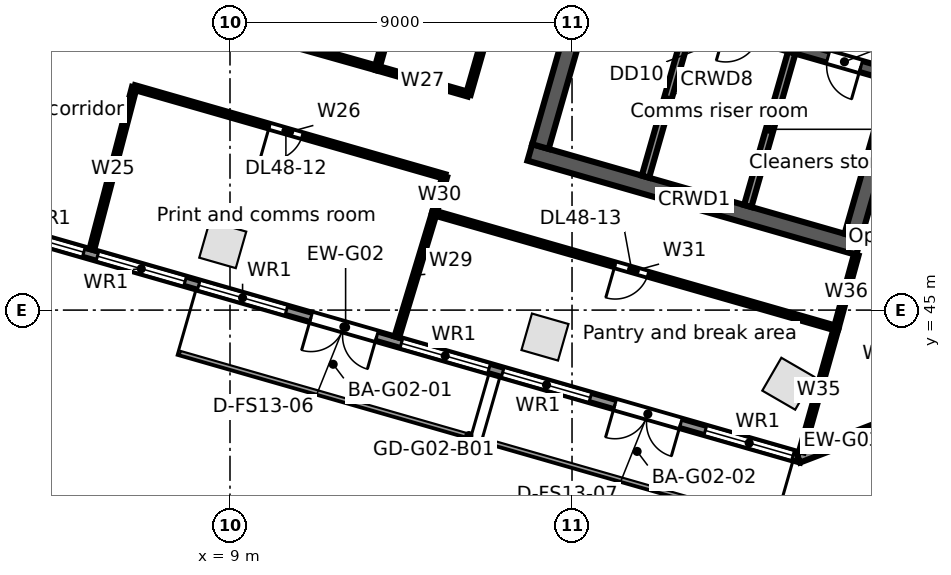
"""IFC4 building model, lengths in metres.
Left out: names, types, materials, properties, quantities, classifications, styles, units other than length and angle.
Written with IfcOpenShell. Run it as: python <this file> out.ifc"""

import sys

from ifc_helpers import new_model, si_unit, direction, frame, frame_2d, origin, origin_2d, place, context, subcontext, project, spatial, rectangle, extrude, element, fill, save


model = new_model("IFC4")
c1 = context("Model", 3, precision=1e-05, world=origin(), true_north=direction((0.0, 1.0)))
c2 = subcontext(c1, "Body", "Model", "MODEL_VIEW")
j1 = project(units=[si_unit("LENGTHUNIT", "METRE"), si_unit("PLANEANGLEUNIT", "RADIAN")], contexts=[c1])
p1 = place(None, origin())
s1 = spatial("IfcSite", under=j1, at=p1, CompositionType="ELEMENT")
p2 = place(p1, origin())
s2 = spatial("IfcBuilding", under=s1, at=p2, CompositionType="ELEMENT")
p3 = place(p2, frame((0.0, 0.0, 223.1)))
s3 = spatial("IfcBuildingStorey", under=s2, at=p3, CompositionType="ELEMENT", Elevation=223.1)
for number, where, z_axis, x_axis in (
    (1, (8.81, 46.722, 0.0), (0.0, 0.0, 1.0), (0.961, -0.276, 0.0)),
    (2, (17.288, 44.291, 0.0), (0.0, 0.0, 1.0), (0.961, -0.276, 0.0)),
    (3, (23.69, 43.063, 0.0), (0.0, 0.0, 1.0), (-0.865, 0.501, 0.0)),
):
    element("IfcColumn", number, at=place(p3, frame(where, z_axis=z_axis, x_axis=x_axis)), inside=s3, PredefinedType="COLUMN", context=c2, shape_type="SweptSolid", body=[
        extrude(rectangle(XDim=1.0, YDim=1.0, at=origin_2d()), origin(), (0.0, 0.0, 1.0), 3.9),
    ])
p4 = place(p3, frame((24.034, 41.108, 0.0), z_axis=(0.0, 0.0, 1.0), x_axis=(-0.96126060691, 0.275641153683, 0.0)))
e4 = element("IfcWall", 4, at=p4, inside=s3, PredefinedType="STANDARD", context=c2, shape_type="SweptSolid", body=[
    extrude(rectangle(XDim=24.951, YDim=0.25, at=frame_2d((12.475, 0.0))), origin(), (0.0, 0.0, 1.0), 3.62),
])
p5 = place(p4, frame((22.416, 0.0, 0.8)))
e5 = element("IfcOpeningElement", 5, at=p5, cuts=e4, PredefinedType="OPENING", context=c2, shape_type="SweptSolid", body=[
    extrude(rectangle(XDim=2.4, YDim=2.2, at=frame_2d((1.2, 1.1))), frame((0.0, 0.135, 0.0), z_axis=(0.0, -1.0, 0.0), x_axis=(1.0, 0.0, 0.0)), (0.0, 0.0, 1.0), 0.27),
])
p6 = place(p4, frame((19.643, 0.0, 0.8)))
e6 = element("IfcOpeningElement", 6, at=p6, cuts=e4, PredefinedType="OPENING", context=c2, shape_type="SweptSolid", body=[
    extrude(rectangle(XDim=2.4, YDim=2.2, at=frame_2d((1.2, 1.1))), frame((0.0, 0.135, 0.0), z_axis=(0.0, -1.0, 0.0), x_axis=(1.0, 0.0, 0.0)), (0.0, 0.0, 1.0), 0.27),
])
p7 = place(p4, frame((16.869, 0.0, 0.8)))
e7 = element("IfcOpeningElement", 7, at=p7, cuts=e4, PredefinedType="OPENING", context=c2, shape_type="SweptSolid", body=[
    extrude(rectangle(XDim=2.4, YDim=2.2, at=frame_2d((1.2, 1.1))), frame((0.0, 0.135, 0.0), z_axis=(0.0, -1.0, 0.0), x_axis=(1.0, 0.0, 0.0)), (0.0, 0.0, 1.0), 0.27),
])
p8 = place(p4, frame((14.096, 0.0, 0.8)))
e8 = element("IfcOpeningElement", 8, at=p8, cuts=e4, PredefinedType="OPENING", context=c2, shape_type="SweptSolid", body=[
    extrude(rectangle(XDim=2.4, YDim=2.2, at=frame_2d((1.2, 1.1))), frame((0.0, 0.135, 0.0), z_axis=(0.0, -1.0, 0.0), x_axis=(1.0, 0.0, 0.0)), (0.0, 0.0, 1.0), 0.27),
])
p9 = place(p4, frame((11.622, 0.0, 0.0)))
e9 = element("IfcOpeningElement", 9, at=p9, cuts=e4, PredefinedType="OPENING", context=c2, shape_type="SweptSolid", body=[
    extrude(rectangle(XDim=1.8, YDim=2.4, at=frame_2d((0.9, 1.2))), frame((0.0, 0.135, 0.0), z_axis=(0.0, -1.0, 0.0), x_axis=(1.0, 0.0, 0.0)), (0.0, 0.0, 1.0), 0.27),
])
p10 = place(p4, frame((8.549, 0.0, 0.8)))
e10 = element("IfcOpeningElement", 10, at=p10, cuts=e4, PredefinedType="OPENING", context=c2, shape_type="SweptSolid", body=[
    extrude(rectangle(XDim=2.4, YDim=2.2, at=frame_2d((1.2, 1.1))), frame((0.0, 0.135, 0.0), z_axis=(0.0, -1.0, 0.0), x_axis=(1.0, 0.0, 0.0)), (0.0, 0.0, 1.0), 0.27),
])
p11 = place(p4, frame((5.775, 0.0, 0.8)))
e11 = element("IfcOpeningElement", 11, at=p11, cuts=e4, PredefinedType="OPENING", context=c2, shape_type="SweptSolid", body=[
    extrude(rectangle(XDim=2.4, YDim=2.2, at=frame_2d((1.2, 1.1))), frame((0.0, 0.135, 0.0), z_axis=(0.0, -1.0, 0.0), x_axis=(1.0, 0.0, 0.0)), (0.0, 0.0, 1.0), 0.27),
])
p12 = place(p4, frame((3.302, 0.0, 0.0)))
e12 = element("IfcOpeningElement", 12, at=p12, cuts=e4, PredefinedType="OPENING", context=c2, shape_type="SweptSolid", body=[
    extrude(rectangle(XDim=1.8, YDim=2.4, at=frame_2d((0.9, 1.2))), frame((0.0, 0.135, 0.0), z_axis=(0.0, -1.0, 0.0), x_axis=(1.0, 0.0, 0.0)), (0.0, 0.0, 1.0), 0.27),
])
p13 = place(p4, frame((0.229, 0.0, 0.8)))
e13 = element("IfcOpeningElement", 13, at=p13, cuts=e4, PredefinedType="OPENING", context=c2, shape_type="SweptSolid", body=[
    extrude(rectangle(XDim=2.4, YDim=2.2, at=frame_2d((1.2, 1.1))), frame((0.0, 0.135, 0.0), z_axis=(0.0, -1.0, 0.0), x_axis=(1.0, 0.0, 0.0)), (0.0, 0.0, 1.0), 0.27),
])
p14 = place(p3, frame((26.27, 41.993, 0.0), z_axis=(0.0, 0.0, 1.0), x_axis=(-0.933573798066, -0.358385216722, 0.0)))
e14 = element("IfcWall", 14, at=p14, inside=s3, PredefinedType="STANDARD", context=c2, shape_type="SweptSolid", body=[
    extrude(rectangle(XDim=2.48, YDim=0.25, at=frame_2d((1.24, 0.0))), origin(), (0.0, 0.0, 1.0), 3.62),
])
p15 = place(p3, frame((16.89, 49.149, 0.0), z_axis=(0.0, 0.0, 1.0), x_axis=(0.96126248289, -0.275634611374, 0.0)))
e15 = element("IfcWall", 15, at=p15, inside=s3, PredefinedType="SOLIDWALL", context=c2, shape_type="SweptSolid", body=[
    extrude(rectangle(XDim=9.0, YDim=0.45, at=frame_2d((4.5, 0.0))), origin(), (0.0, 0.0, 1.0), 3.62),
])
p16 = place(p3, frame((21.131, 52.692, 0.0), z_axis=(0.0, 0.0, 1.0), x_axis=(0.961261488075, -0.275638080722, 0.0)))
e16 = element("IfcWall", 16, at=p16, inside=s3, PredefinedType="SOLIDWALL", context=c2, shape_type="SweptSolid", body=[
    extrude(rectangle(XDim=5.45, YDim=0.3, at=frame_2d((2.725, 0.0))), origin(), (0.0, 0.0, 1.0), 3.62),
])
p17 = place(p16, frame((0.95, 0.0, 0.0)))
e17 = element("IfcOpeningElement", 17, at=p17, cuts=e16, PredefinedType="OPENING", context=c2, shape_type="SweptSolid", body=[
    extrude(rectangle(XDim=0.9, YDim=2.1, at=frame_2d((0.45, 1.05))), frame((0.0, 0.16, 0.0), z_axis=(0.0, -1.0, 0.0), x_axis=(1.0, 0.0, 0.0)), (0.0, 0.0, 1.0), 0.32),
])
p18 = place(p16, frame((3.75, 0.0, 0.0)))
e18 = element("IfcOpeningElement", 18, at=p18, cuts=e16, PredefinedType="OPENING", context=c2, shape_type="SweptSolid", body=[
    extrude(rectangle(XDim=0.9, YDim=2.1, at=frame_2d((0.45, 1.05))), frame((0.0, 0.16, 0.0), z_axis=(0.0, -1.0, 0.0), x_axis=(1.0, 0.0, 0.0)), (0.0, 0.0, 1.0), 0.32),
])
p19 = place(p3, frame((17.168, 49.303, 0.0), z_axis=(0.0, 0.0, 1.0), x_axis=(0.275638974822, 0.961261231695, 0.0)))
e19 = element("IfcWall", 19, at=p19, inside=s3, PredefinedType="SOLIDWALL", context=c2, shape_type="SweptSolid", body=[
    extrude(rectangle(XDim=11.1, YDim=0.45, at=frame_2d((5.55, 0.0))), origin(), (0.0, 0.0, 1.0), 3.62),
])
p20 = place(p19, frame((4.95, 0.0, 0.0)))
e20 = element("IfcOpeningElement", 20, at=p20, cuts=e19, PredefinedType="OPENING", context=c2, shape_type="SweptSolid", body=[
    extrude(rectangle(XDim=1.2, YDim=2.1, at=frame_2d((0.6, 1.05))), frame((0.0, 0.235, 0.0), z_axis=(0.0, -1.0, 0.0), x_axis=(1.0, 0.0, 0.0)), (0.0, 0.0, 1.0), 0.47),
])
p21 = place(p3, frame((19.932, 48.511, 0.0), z_axis=(0.0, 0.0, 1.0), x_axis=(0.275642273411, 0.961260285827, 0.0)))
e21 = element("IfcWall", 21, at=p21, inside=s3, PredefinedType="SOLIDWALL", context=c2, shape_type="SweptSolid", body=[
    extrude(rectangle(XDim=4.2, YDim=0.2, at=frame_2d((2.1, 0.0))), origin(), (0.0, 0.0, 1.0), 3.62),
])
p22 = place(p3, frame((22.623, 47.739, 0.0), z_axis=(0.0, 0.0, 1.0), x_axis=(0.275642273411, 0.961260285827, 0.0)))
e22 = element("IfcWall", 22, at=p22, inside=s3, PredefinedType="PARTITIONING", context=c2, shape_type="SweptSolid", body=[
    extrude(rectangle(XDim=4.2, YDim=0.2, at=frame_2d((2.1, 0.0))), origin(), (0.0, 0.0, 1.0), 3.62),
])
p23 = place(p3, frame((25.387, 46.947, 0.0), z_axis=(0.0, 0.0, 1.0), x_axis=(0.275638974822, 0.961261231695, 0.0)))
e23 = element("IfcWall", 23, at=p23, inside=s3, PredefinedType="SOLIDWALL", context=c2, shape_type="SweptSolid", body=[
    extrude(rectangle(XDim=11.1, YDim=0.45, at=frame_2d((5.55, 0.0))), origin(), (0.0, 0.0, 1.0), 3.62),
])
p24 = place(p23, frame((4.95, 0.0, 0.0)))
e24 = element("IfcOpeningElement", 24, at=p24, cuts=e23, PredefinedType="OPENING", context=c2, shape_type="SweptSolid", body=[
    extrude(rectangle(XDim=1.2, YDim=2.1, at=frame_2d((0.6, 1.05))), frame((0.0, 0.235, 0.0), z_axis=(0.0, -1.0, 0.0), x_axis=(1.0, 0.0, 0.0)), (0.0, 0.0, 1.0), 0.47),
])
p25 = place(p3, frame((0.0, 55.0, 0.0), z_axis=(0.0, 0.0, 1.0), x_axis=(0.962402937884, -0.271625818271, 0.0)))
e25 = element("IfcWall", 25, at=p25, inside=s3, PredefinedType="PARTITIONING", context=c2, shape_type="SweptSolid", body=[
    extrude(rectangle(XDim=13.372, YDim=0.125, at=frame_2d((6.686, 0.0))), origin(), (0.0, 0.0, 1.0), 2.8),
])
p26 = place(p25, frame((5.7, 0.0, 0.0)))
e26 = element("IfcOpeningElement", 26, at=p26, cuts=e25, PredefinedType="OPENING", context=c2, shape_type="SweptSolid", body=[
    extrude(rectangle(XDim=1.8, YDim=2.1, at=frame_2d((0.9, 1.05))), frame((0.0, 0.073, 0.0), z_axis=(0.0, -1.0, 0.0), x_axis=(1.0, 0.0, 0.0)), (0.0, 0.0, 1.0), 0.145),
])
p27 = place(p3, frame((5.364, 46.592, 0.0), z_axis=(0.0, 0.0, 1.0), x_axis=(0.253446952203, 0.967349286669, 0.0)))
e27 = element("IfcWall", 27, at=p27, inside=s3, PredefinedType="PARTITIONING", context=c2, shape_type="SweptSolid", body=[
    extrude(rectangle(XDim=4.411, YDim=0.125, at=frame_2d((2.206, 0.0))), origin(), (0.0, 0.0, 1.0), 2.988),
])
p28 = place(p3, frame((6.482, 50.859, 0.0), z_axis=(0.0, 0.0, 1.0), x_axis=(0.961261196169, -0.275639098713, 0.0)))
e28 = element("IfcWall", 28, at=p28, inside=s3, PredefinedType="PARTITIONING", context=c2, shape_type="SweptSolid", body=[
    extrude(rectangle(XDim=8.5, YDim=0.125, at=frame_2d((4.25, 0.0))), origin(), (0.0, 0.0, 1.0), 2.8),
])
p29 = place(p28, frame((3.7, 0.0, 0.0)))
e29 = element("IfcOpeningElement", 29, at=p29, cuts=e28, PredefinedType="OPENING", context=c2, shape_type="SweptSolid", body=[
    extrude(rectangle(XDim=0.9, YDim=2.1, at=frame_2d((0.45, 1.05))), frame((0.0, 0.073, 0.0), z_axis=(0.0, -1.0, 0.0), x_axis=(1.0, 0.0, 0.0)), (0.0, 0.0, 1.0), 0.145),
])
p30 = place(p3, frame((12.869, 51.368, 0.0), z_axis=(0.0, 0.0, 1.0), x_axis=(0.961302601161, -0.275494662382, 0.0)))
e30 = element("IfcWall", 30, at=p30, inside=s3, PredefinedType="PARTITIONING", context=c2, shape_type="SweptSolid", body=[
    extrude(rectangle(XDim=2.501, YDim=0.125, at=frame_2d((1.25, 0.0))), origin(), (0.0, 0.0, 1.0), 3.62),
])
p31 = place(p3, frame((12.869, 51.368, 0.0), z_axis=(0.0, 0.0, 1.0), x_axis=(0.269547555311, 0.962987079574, 0.0)))
e31 = element("IfcWall", 31, at=p31, inside=s3, PredefinedType="PARTITIONING", context=c2, shape_type="SweptSolid", body=[
    extrude(rectangle(XDim=16.161, YDim=0.125, at=frame_2d((8.081, 0.0))), origin(), (0.0, 0.0, 1.0), 2.792),
])
p32 = place(p3, frame((13.39, 44.29, 0.0), z_axis=(0.0, 0.0, 1.0), x_axis=(0.289389501276, 0.957211427299, 0.0)))
e32 = element("IfcWall", 32, at=p32, inside=s3, PredefinedType="PARTITIONING", context=c2, shape_type="SweptSolid", body=[
    extrude(rectangle(XDim=3.411, YDim=0.125, at=frame_2d((1.706, 0.0))), origin(), (0.0, 0.0, 1.0), 2.994),
])
p33 = place(p3, frame((14.377, 47.555, 0.0), z_axis=(0.0, 0.0, 1.0), x_axis=(0.275204870584, 0.961385603807, 0.0)))
e33 = element("IfcWall", 33, at=p33, inside=s3, PredefinedType="PARTITIONING", context=c2, shape_type="SweptSolid", body=[
    extrude(rectangle(XDim=1.0, YDim=0.125, at=frame_2d((0.5, 0.0))), origin(), (0.0, 0.0, 1.0), 3.62),
])
p34 = place(p3, frame((14.377, 47.555, 0.0), z_axis=(0.0, 0.0, 1.0), x_axis=(0.961263044958, -0.275632651182, 0.0)))
e34 = element("IfcWall", 34, at=p34, inside=s3, PredefinedType="PARTITIONING", context=c2, shape_type="SweptSolid", body=[
    extrude(rectangle(XDim=11.0, YDim=0.125, at=frame_2d((5.5, 0.0))), origin(), (0.0, 0.0, 1.0), 2.9),
])
p35 = place(p34, frame((4.95, 0.0, 0.0)))
e35 = element("IfcOpeningElement", 35, at=p35, cuts=e34, PredefinedType="OPENING", context=c2, shape_type="SweptSolid", body=[
    extrude(rectangle(XDim=0.9, YDim=2.1, at=frame_2d((0.45, 1.05))), frame((0.0, 0.073, 0.0), z_axis=(0.0, -1.0, 0.0), x_axis=(1.0, 0.0, 0.0)), (0.0, 0.0, 1.0), 0.145),
])
p36 = place(p3, frame((15.273, 50.679, 0.0), z_axis=(0.0, 0.0, 1.0), x_axis=(0.275494973205, 0.961302512084, 0.0)))
e36 = element("IfcWall", 36, at=p36, inside=s3, PredefinedType="PARTITIONING", context=c2, shape_type="SweptSolid", body=[
    extrude(rectangle(XDim=5.75, YDim=0.125, at=frame_2d((2.875, 0.0))), origin(), (0.0, 0.0, 1.0), 2.8),
])
p37 = place(p36, frame((2.45, 0.0, 0.0)))
e37 = element("IfcOpeningElement", 37, at=p37, cuts=e36, PredefinedType="OPENING", context=c2, shape_type="SweptSolid", body=[
    extrude(rectangle(XDim=0.9, YDim=2.1, at=frame_2d((0.45, 1.05))), frame((0.0, 0.073, 0.0), z_axis=(0.0, -1.0, 0.0), x_axis=(1.0, 0.0, 0.0)), (0.0, 0.0, 1.0), 0.145),
])
p38 = place(p3, frame((24.036, 41.27, 0.0), z_axis=(0.0, 0.0, 1.0), x_axis=(0.270787421954, 0.962639170256, 0.0)))
e38 = element("IfcWall", 38, at=p38, inside=s3, PredefinedType="PARTITIONING", context=c2, shape_type="SweptSolid", body=[
    extrude(rectangle(XDim=3.379, YDim=0.125, at=frame_2d((1.689, 0.0))), origin(), (0.0, 0.0, 1.0), 2.9),
])
p39 = place(p3, frame((24.951, 44.523, 0.0), z_axis=(0.0, 0.0, 1.0), x_axis=(0.264046927145, 0.964509834198, 0.0)))
e39 = element("IfcWall", 39, at=p39, inside=s3, PredefinedType="PARTITIONING", context=c2, shape_type="SweptSolid", body=[
    extrude(rectangle(XDim=2.0, YDim=0.125, at=frame_2d((1.0, 0.0))), origin(), (0.0, 0.0, 1.0), 2.9),
])
p40 = place(p6, origin())
e40 = element("IfcWindow", 40, at=p40, inside=s3, PartitioningType="SINGLE_PANEL", PredefinedType="WINDOW", context=c2, shape_type="SweptSolid", body=[
    extrude(rectangle(XDim=2.4, YDim=2.2, at=frame_2d((1.2, 1.1))), frame((0.0, 0.03, 0.0), z_axis=(0.0, -1.0, 0.0), x_axis=(1.0, 0.0, 0.0)), (0.0, 0.0, 1.0), 0.06),
])
fill(e6, e40)
p41 = place(p7, origin())
e41 = element("IfcWindow", 41, at=p41, inside=s3, PartitioningType="SINGLE_PANEL", PredefinedType="WINDOW", context=c2, shape_type="SweptSolid", body=[
    extrude(rectangle(XDim=2.4, YDim=2.2, at=frame_2d((1.2, 1.1))), frame((0.0, 0.03, 0.0), z_axis=(0.0, -1.0, 0.0), x_axis=(1.0, 0.0, 0.0)), (0.0, 0.0, 1.0), 0.06),
])
fill(e7, e41)
p42 = place(p8, origin())
e42 = element("IfcWindow", 42, at=p42, inside=s3, PartitioningType="SINGLE_PANEL", PredefinedType="WINDOW", context=c2, shape_type="SweptSolid", body=[
    extrude(rectangle(XDim=2.4, YDim=2.2, at=frame_2d((1.2, 1.1))), frame((0.0, 0.03, 0.0), z_axis=(0.0, -1.0, 0.0), x_axis=(1.0, 0.0, 0.0)), (0.0, 0.0, 1.0), 0.06),
])
fill(e8, e42)
p43 = place(p9, origin())
e43 = element("IfcDoor", 43, at=p43, inside=s3, OperationType="DOUBLE_DOOR_SINGLE_SWING", PredefinedType="DOOR", context=c2, shape_type="SweptSolid", body=[
    extrude(rectangle(XDim=1.8, YDim=2.4, at=frame_2d((0.9, 1.2))), frame((0.0, 0.025, 0.0), z_axis=(0.0, -1.0, 0.0), x_axis=(1.0, 0.0, 0.0)), (0.0, 0.0, 1.0), 0.05),
])
fill(e9, e43)
p44 = place(p10, origin())
e44 = element("IfcWindow", 44, at=p44, inside=s3, PartitioningType="SINGLE_PANEL", PredefinedType="WINDOW", context=c2, shape_type="SweptSolid", body=[
    extrude(rectangle(XDim=2.4, YDim=2.2, at=frame_2d((1.2, 1.1))), frame((0.0, 0.03, 0.0), z_axis=(0.0, -1.0, 0.0), x_axis=(1.0, 0.0, 0.0)), (0.0, 0.0, 1.0), 0.06),
])
fill(e10, e44)
p45 = place(p11, origin())
e45 = element("IfcWindow", 45, at=p45, inside=s3, PartitioningType="SINGLE_PANEL", PredefinedType="WINDOW", context=c2, shape_type="SweptSolid", body=[
    extrude(rectangle(XDim=2.4, YDim=2.2, at=frame_2d((1.2, 1.1))), frame((0.0, 0.03, 0.0), z_axis=(0.0, -1.0, 0.0), x_axis=(1.0, 0.0, 0.0)), (0.0, 0.0, 1.0), 0.06),
])
fill(e11, e45)
p46 = place(p12, origin())
e46 = element("IfcDoor", 46, at=p46, inside=s3, OperationType="DOUBLE_DOOR_SINGLE_SWING", PredefinedType="DOOR", context=c2, shape_type="SweptSolid", body=[
    extrude(rectangle(XDim=1.8, YDim=2.4, at=frame_2d((0.9, 1.2))), frame((0.0, 0.025, 0.0), z_axis=(0.0, -1.0, 0.0), x_axis=(1.0, 0.0, 0.0)), (0.0, 0.0, 1.0), 0.05),
])
fill(e12, e46)
p47 = place(p13, origin())
e47 = element("IfcWindow", 47, at=p47, inside=s3, PartitioningType="SINGLE_PANEL", PredefinedType="WINDOW", context=c2, shape_type="SweptSolid", body=[
    extrude(rectangle(XDim=2.4, YDim=2.2, at=frame_2d((1.2, 1.1))), frame((0.0, 0.03, 0.0), z_axis=(0.0, -1.0, 0.0), x_axis=(1.0, 0.0, 0.0)), (0.0, 0.0, 1.0), 0.06),
])
fill(e13, e47)
p48 = place(p18, frame((0.9, 0.0, 0.0), z_axis=(0.0, 0.0, 1.0), x_axis=(-1.0, 0.0, 0.0)))
e48 = element("IfcDoor", 48, at=p48, inside=s3, OperationType="SINGLE_SWING_LEFT", PredefinedType="DOOR", context=c2, shape_type="SweptSolid", body=[
    extrude(rectangle(XDim=0.9, YDim=2.1, at=frame_2d((0.45, 1.05))), frame((0.0, 0.025, 0.0), z_axis=(0.0, -1.0, 0.0), x_axis=(1.0, 0.0, 0.0)), (0.0, 0.0, 1.0), 0.05),
])
fill(e18, e48)
p49 = place(p29, frame((0.9, 0.0, 0.0), z_axis=(0.0, 0.0, 1.0), x_axis=(-1.0, 0.0, 0.0)))
e49 = element("IfcDoor", 49, at=p49, inside=s3, OperationType="SINGLE_SWING_RIGHT", PredefinedType="DOOR", context=c2, shape_type="SweptSolid", body=[
    extrude(rectangle(XDim=0.9, YDim=2.1, at=frame_2d((0.45, 1.05))), frame((0.0, 0.025, 0.0), z_axis=(0.0, -1.0, 0.0), x_axis=(1.0, 0.0, 0.0)), (0.0, 0.0, 1.0), 0.05),
])
fill(e29, e49)
p50 = place(p35, frame((0.9, 0.0, 0.0), z_axis=(0.0, 0.0, 1.0), x_axis=(-1.0, 0.0, 0.0)))
e50 = element("IfcDoor", 50, at=p50, inside=s3, OperationType="SINGLE_SWING_RIGHT", PredefinedType="DOOR", context=c2, shape_type="SweptSolid", body=[
    extrude(rectangle(XDim=0.9, YDim=2.1, at=frame_2d((0.45, 1.05))), frame((0.0, 0.025, 0.0), z_axis=(0.0, -1.0, 0.0), x_axis=(1.0, 0.0, 0.0)), (0.0, 0.0, 1.0), 0.05),
])
fill(e35, e50)
save(model, sys.argv[1])
